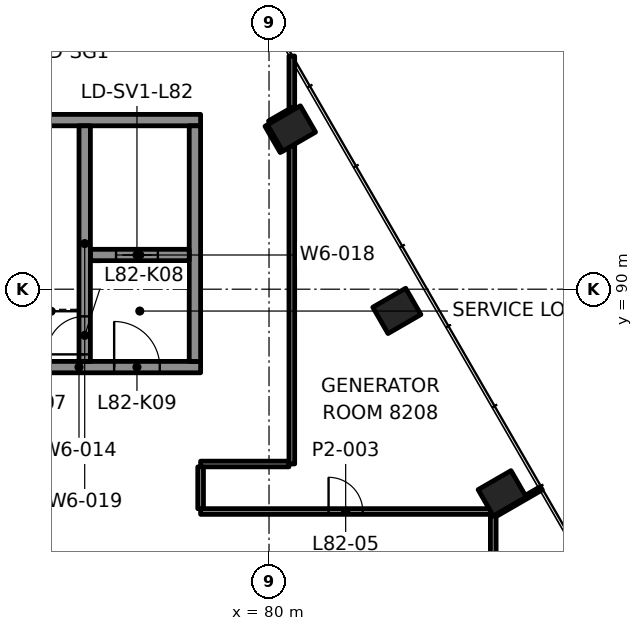
"""IFC4 building model, lengths in metres.
Left out: names, types, materials, properties, quantities, classifications, styles, units other than length and angle.
Written with IfcOpenShell. Run it as: python <this file> out.ifc"""

import sys

from ifc_helpers import new_model, si_unit, direction, frame, frame_2d, origin, origin_2d, place, context, subcontext, project, spatial, rectangle, hollow_rectangle, extrude, element, fill, save


model = new_model("IFC4")
c1 = context("Model", 3, precision=1e-05, world=origin(), true_north=direction((0.0, 1.0)))
c2 = subcontext(c1, "Body", "Model", "MODEL_VIEW")
j1 = project(units=[si_unit("LENGTHUNIT", "METRE"), si_unit("PLANEANGLEUNIT", "RADIAN")], contexts=[c1])
p1 = place(None, origin())
s1 = spatial("IfcSite", under=j1, at=p1, CompositionType="ELEMENT")
p2 = place(p1, origin())
s2 = spatial("IfcBuilding", under=s1, at=p2, CompositionType="ELEMENT")
p3 = place(p2, frame((0.0, 0.0, 335.6)))
s3 = spatial("IfcBuildingStorey", under=s2, at=p3, CompositionType="ELEMENT", Elevation=335.6)
for number, where, z_axis, x_axis in (
    (1, (86.135, 84.629, -0.0), (0.0, 0.0, 1.0), (-0.5, 0.866, 0.0)),
    (2, (83.364, 89.429, -0.0), (0.0, 0.0, 1.0), (-0.5, 0.866, 0.0)),
    (3, (80.592, 94.229, -0.0), (0.0, 0.0, 1.0), (-0.5, 0.866, 0.0)),
):
    element("IfcColumn", number, at=place(p3, frame(where, z_axis=z_axis, x_axis=x_axis)), inside=s3, PredefinedType="COLUMN", context=c2, shape_type="SweptSolid", body=[
        extrude(hollow_rectangle(XDim=0.8, YDim=1.0, WallThickness=0.05, at=origin_2d()), origin(), (0.0, 0.0, 1.0), 3.701),
    ])
p4 = place(p3, frame((71.8, 87.95, 0.0), z_axis=(0.0, 0.0, 1.0), x_axis=(1.0, 0.0, 0.0)))
e4 = element("IfcWall", 4, at=p4, inside=s3, PredefinedType="SHEAR", context=c2, shape_type="SweptSolid", body=[
    extrude(rectangle(XDim=6.4, YDim=0.3, at=frame_2d((3.2, 0.0))), origin(), (0.0, 0.0, 1.0), 3.7),
])
p5 = place(p4, frame((1.325, 0.0, 0.0)))
e5 = element("IfcOpeningElement", 5, at=p5, cuts=e4, PredefinedType="OPENING", context=c2, shape_type="SweptSolid", body=[
    extrude(rectangle(XDim=1.0, YDim=2.1, at=frame_2d((0.5, 1.05))), frame((0.0, 0.16, 0.0), z_axis=(0.0, -1.0, 0.0), x_axis=(1.0, 0.0, 0.0)), (0.0, 0.0, 1.0), 0.32),
])
p6 = place(p4, frame((4.125, 0.0, 0.0)))
e6 = element("IfcOpeningElement", 6, at=p6, cuts=e4, PredefinedType="OPENING", context=c2, shape_type="SweptSolid", body=[
    extrude(rectangle(XDim=1.2, YDim=2.1, at=frame_2d((0.6, 1.05))), frame((0.0, 0.16, 0.0), z_axis=(0.0, -1.0, 0.0), x_axis=(1.0, 0.0, 0.0)), (0.0, 0.0, 1.0), 0.32),
])
p7 = place(p3, frame((71.8, 94.45, 0.0), z_axis=(0.0, 0.0, 1.0), x_axis=(1.0, 0.0, 0.0)))
e7 = element("IfcWall", 7, at=p7, inside=s3, PredefinedType="SHEAR", context=c2, shape_type="SweptSolid", body=[
    extrude(rectangle(XDim=6.4, YDim=0.3, at=frame_2d((3.2, 0.0))), origin(), (0.0, 0.0, 1.0), 3.7),
])
p8 = place(p3, frame((78.05, 88.1, 0.0), z_axis=(0.0, 0.0, 1.0), x_axis=(0.0, 1.0, 0.0)))
e8 = element("IfcWall", 8, at=p8, inside=s3, PredefinedType="SHEAR", context=c2, shape_type="SweptSolid", body=[
    extrude(rectangle(XDim=6.2, YDim=0.3, at=frame_2d((3.1, 0.0))), origin(), (0.0, 0.0, 1.0), 3.7),
])
p9 = place(p3, frame((75.3, 90.9, 0.0), z_axis=(0.0, 0.0, 1.0), x_axis=(1.0, 0.0, 0.0)))
e9 = element("IfcWall", 9, at=p9, inside=s3, PredefinedType="SHEAR", context=c2, shape_type="SweptSolid", body=[
    extrude(rectangle(XDim=2.6, YDim=0.3, at=frame_2d((1.3, 0.0))), origin(), (0.0, 0.0, 1.0), 3.7),
])
p10 = place(p9, frame((0.675, 0.0, 0.0)))
e10 = element("IfcOpeningElement", 10, at=p10, cuts=e9, PredefinedType="OPENING", context=c2, shape_type="SweptSolid", body=[
    extrude(rectangle(XDim=1.1, YDim=2.1, at=frame_2d((0.55, 1.05))), frame((0.0, 0.16, 0.0), z_axis=(0.0, -1.0, 0.0), x_axis=(1.0, 0.0, 0.0)), (0.0, 0.0, 1.0), 0.32),
])
p11 = place(p3, frame((75.15, 88.1, 0.0), z_axis=(0.0, 0.0, 1.0), x_axis=(0.0, 1.0, 0.0)))
e11 = element("IfcWall", 11, at=p11, inside=s3, PredefinedType="SHEAR", context=c2, shape_type="SweptSolid", body=[
    extrude(rectangle(XDim=6.2, YDim=0.3, at=frame_2d((3.1, 0.0))), origin(), (0.0, 0.0, 1.0), 3.7),
])
p12 = place(p11, frame((0.185, 0.0, 0.0)))
e12 = element("IfcOpeningElement", 12, at=p12, cuts=e11, PredefinedType="OPENING", context=c2, shape_type="SweptSolid", body=[
    extrude(rectangle(XDim=1.0, YDim=2.1, at=frame_2d((0.5, 1.05))), frame((0.0, 0.16, 0.0), z_axis=(0.0, -1.0, 0.0), x_axis=(1.0, 0.0, 0.0)), (0.0, 0.0, 1.0), 0.32),
])
p13 = place(p3, frame((78.2, 84.15, 0.0), z_axis=(0.0, 0.0, 1.0), x_axis=(1.0, 0.0, 0.0)))
e13 = element("IfcWall", 13, at=p13, inside=s3, PredefinedType="PARTITIONING", context=c2, shape_type="SweptSolid", body=[
    extrude(rectangle(XDim=7.634, YDim=0.15, at=frame_2d((3.817, 0.0))), origin(), (0.0, 0.0, 1.0), 3.1),
])
p14 = place(p13, frame((3.367, 0.0, 0.0)))
e14 = element("IfcOpeningElement", 14, at=p14, cuts=e13, PredefinedType="OPENING", context=c2, shape_type="SweptSolid", body=[
    extrude(rectangle(XDim=0.9, YDim=2.1, at=frame_2d((0.45, 1.05))), frame((0.0, 0.085, 0.0), z_axis=(0.0, -1.0, 0.0), x_axis=(1.0, 0.0, 0.0)), (0.0, 0.0, 1.0), 0.17),
])
p15 = place(p3, frame((78.2, 85.4, 0.0), z_axis=(0.0, 0.0, 1.0), x_axis=(1.0, 0.0, 0.0)))
e15 = element("IfcWall", 15, at=p15, inside=s3, PredefinedType="PARTITIONING", context=c2, shape_type="SweptSolid", body=[
    extrude(rectangle(XDim=2.324, YDim=0.15, at=frame_2d((1.162, 0.0))), origin(), (0.0, 0.0, 1.0), 3.1),
])
p16 = place(p3, frame((85.978, 84.076, 0.0), z_axis=(0.0, 0.0, 1.0), x_axis=(0.866001980287, 0.500040568494, 0.0)))
e16 = element("IfcWall", 16, at=p16, inside=s3, PredefinedType="PARTITIONING", context=c2, shape_type="SweptSolid", body=[
    extrude(rectangle(XDim=1.373, YDim=0.1, at=frame_2d((0.687, 0.0))), origin(), (0.0, 0.0, 1.0), 3.088),
])
p17 = place(p3, frame((80.024, 94.364, 0.0), z_axis=(0.0, 0.0, 1.0), x_axis=(0.865995903571, 0.500051092388, 0.0)))
e17 = element("IfcWall", 17, at=p17, inside=s3, PredefinedType="PARTITIONING", context=c2, shape_type="SweptSolid", body=[
    extrude(rectangle(XDim=0.665, YDim=0.15, at=frame_2d((0.332, 0.0))), origin(), (0.0, 0.0, 1.0), 3.1),
])
p18 = place(p3, frame((85.9, 84.036, 0.0), z_axis=(0.0, 0.0, 1.0), x_axis=(0.0, -1.0, 0.0)))
e18 = element("IfcWall", 18, at=p18, inside=s3, PredefinedType="PARTITIONING", context=c2, shape_type="SweptSolid", body=[
    extrude(rectangle(XDim=13.943, YDim=0.15, at=frame_2d((6.972, 0.0))), origin(), (0.0, 0.0, 1.0), 3.1),
])
p19 = place(p18, frame((5.223, 0.0, 0.0)))
e19 = element("IfcOpeningElement", 19, at=p19, cuts=e18, PredefinedType="OPENING", context=c2, shape_type="SweptSolid", body=[
    extrude(rectangle(XDim=0.9, YDim=2.1, at=frame_2d((0.45, 1.05))), frame((0.0, 0.085, 0.0), z_axis=(0.0, -1.0, 0.0), x_axis=(1.0, 0.0, 0.0)), (0.0, 0.0, 1.0), 0.17),
])
p20 = place(p18, frame((11.991, 0.0, 0.0)))
e20 = element("IfcOpeningElement", 20, at=p20, cuts=e18, PredefinedType="OPENING", context=c2, shape_type="SweptSolid", body=[
    extrude(rectangle(XDim=0.9, YDim=2.1, at=frame_2d((0.45, 1.05))), frame((0.0, 0.085, 0.0), z_axis=(0.0, -1.0, 0.0), x_axis=(1.0, 0.0, 0.0)), (0.0, 0.0, 1.0), 0.17),
])
p21 = place(p3, frame((80.6, 85.401, 0.0), z_axis=(0.0, 0.0, 1.0), x_axis=(0.0, 1.0, 0.0)))
e21 = element("IfcWall", 21, at=p21, inside=s3, PredefinedType="PARTITIONING", context=c2, shape_type="SweptSolid", body=[
    extrude(rectangle(XDim=8.371, YDim=0.15, at=frame_2d((4.185, 0.0))), origin(), (0.0, 0.0, 1.0), 3.1),
])
p22 = place(p3, frame((80.6, 94.783, 0.0), z_axis=(0.0, 0.0, 1.0), x_axis=(0.0, 1.0, 0.0)))
e22 = element("IfcWall", 22, at=p22, inside=s3, PredefinedType="PARTITIONING", context=c2, shape_type="SweptSolid", body=[
    extrude(rectangle(XDim=1.353, YDim=0.15, at=frame_2d((0.676, 0.0))), origin(), (0.0, 0.0, 1.0), 3.1),
])
p23 = place(p3, frame((78.2, 84.225, 0.0), z_axis=(0.0, 0.0, 1.0), x_axis=(0.0, 1.0, 0.0)))
e23 = element("IfcWall", 23, at=p23, inside=s3, PredefinedType="PARTITIONING", context=c2, shape_type="SweptSolid", body=[
    extrude(rectangle(XDim=1.1, YDim=0.15, at=frame_2d((0.55, 0.0))), origin(), (0.0, 0.0, 1.0), 3.1),
])
p24 = place(p3, frame((80.358, 93.633, 0.0), z_axis=(0.0, 0.0, 1.0), x_axis=(-0.499951716245, 0.866053278629, 0.0)))
e24 = element("IfcWall", 24, at=p24, inside=s3, PredefinedType="PARTITIONING", context=c2, shape_type="SweptSolid", body=[
    extrude(rectangle(XDim=0.799, YDim=0.15, at=frame_2d((0.399, 0.0))), origin(), (0.0, 0.0, 1.0), 3.1),
])
p25 = place(p14, origin())
e25 = element("IfcDoor", 25, at=p25, inside=s3, OperationType="SINGLE_SWING_LEFT", PredefinedType="DOOR", context=c2, shape_type="SweptSolid", body=[
    extrude(rectangle(XDim=0.9, YDim=2.1, at=frame_2d((0.45, 1.05))), frame((0.0, 0.025, 0.0), z_axis=(0.0, -1.0, 0.0), x_axis=(1.0, 0.0, 0.0)), (0.0, 0.0, 1.0), 0.05),
])
fill(e14, e25)
p26 = place(p10, origin())
e26 = element("IfcDoor", 26, at=p26, inside=s3, OperationType="DOUBLE_DOOR_SLIDING", PredefinedType="DOOR", context=c2, shape_type="SweptSolid", body=[
    extrude(rectangle(XDim=1.1, YDim=2.1, at=frame_2d((0.55, 1.05))), frame((0.0, 0.025, 0.0), z_axis=(0.0, -1.0, 0.0), x_axis=(1.0, 0.0, 0.0)), (0.0, 0.0, 1.0), 0.05),
])
fill(e10, e26)
p27 = place(p12, origin())
e27 = element("IfcDoor", 27, at=p27, inside=s3, OperationType="SINGLE_SWING_LEFT", PredefinedType="DOOR", context=c2, shape_type="SweptSolid", body=[
    extrude(rectangle(XDim=1.0, YDim=2.1, at=frame_2d((0.5, 1.05))), frame((0.0, 0.025, 0.0), z_axis=(0.0, -1.0, 0.0), x_axis=(1.0, 0.0, 0.0)), (0.0, 0.0, 1.0), 0.05),
])
fill(e12, e27)
p28 = place(p6, origin())
e28 = element("IfcDoor", 28, at=p28, inside=s3, OperationType="SINGLE_SWING_RIGHT", PredefinedType="DOOR", context=c2, shape_type="SweptSolid", body=[
    extrude(rectangle(XDim=1.2, YDim=2.1, at=frame_2d((0.6, 1.05))), frame((0.0, 0.025, 0.0), z_axis=(0.0, -1.0, 0.0), x_axis=(1.0, 0.0, 0.0)), (0.0, 0.0, 1.0), 0.05),
])
fill(e6, e28)
save(model, sys.argv[1])
